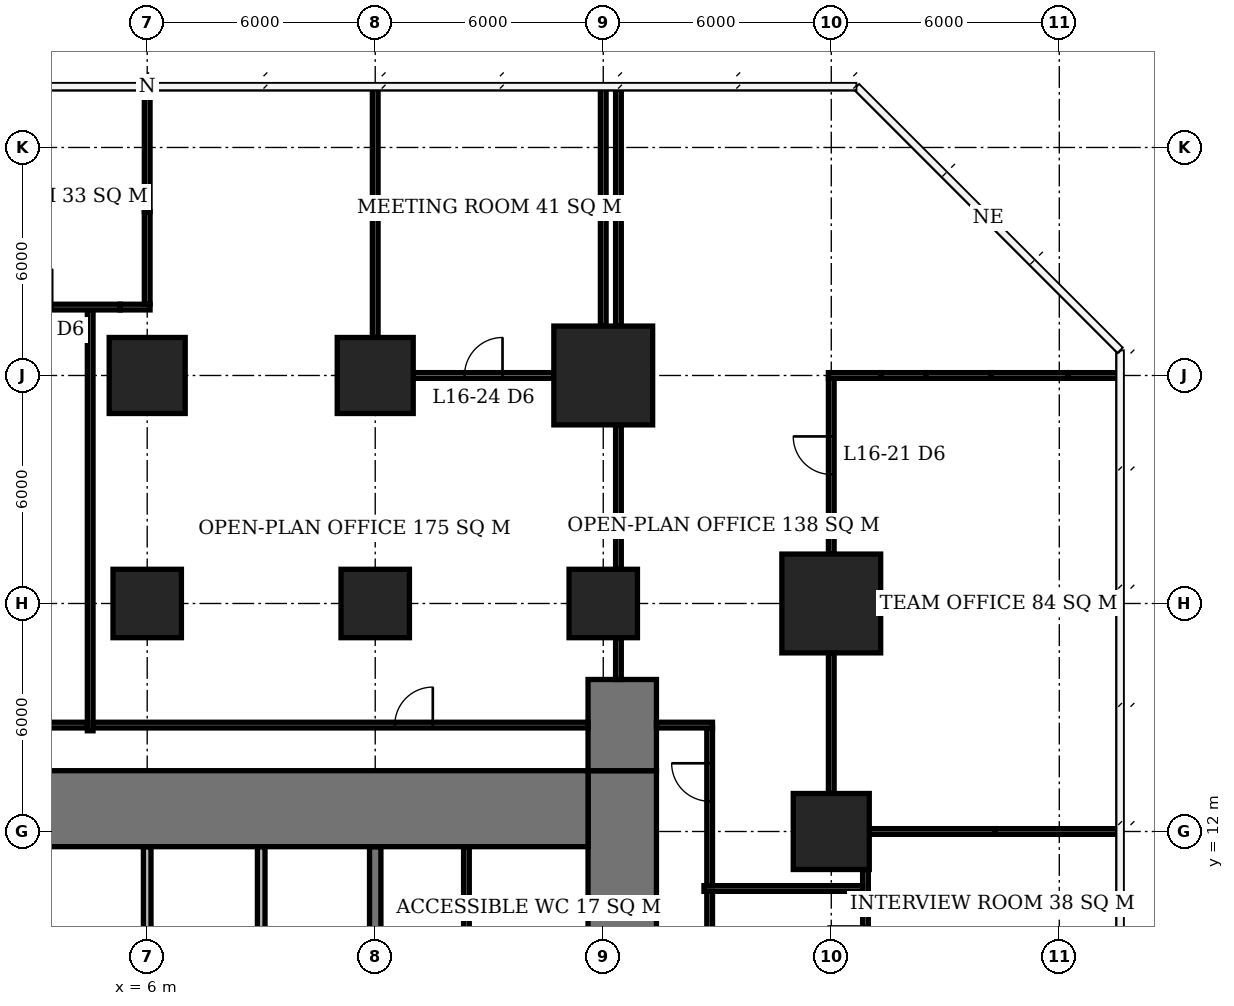
"""IFC4 building model, lengths in metres.
Left out: names, types, materials, properties, quantities, classifications, styles, units other than length and angle.
Written with IfcOpenShell. Run it as: python <this file> out.ifc"""

import sys

from ifc_helpers import new_model, si_unit, direction, frame, frame_2d, origin, origin_2d, place, context, subcontext, project, spatial, rectangle, extrude, element, fill, save


model = new_model("IFC4")
c1 = context("Model", 3, precision=1e-05, world=origin(), true_north=direction((0.0, 1.0)))
c2 = subcontext(c1, "Body", "Model", "MODEL_VIEW")
j1 = project(units=[si_unit("LENGTHUNIT", "METRE"), si_unit("PLANEANGLEUNIT", "RADIAN")], contexts=[c1])
p1 = place(None, origin())
s1 = spatial("IfcSite", under=j1, at=p1, CompositionType="ELEMENT")
p2 = place(p1, origin())
s2 = spatial("IfcBuilding", under=s1, at=p2, CompositionType="ELEMENT")
p3 = place(p2, frame((0.0, 0.0, 68.9)))
s3 = spatial("IfcBuildingStorey", under=s2, at=p3, CompositionType="ELEMENT", Elevation=68.9)
p4 = place(p3, frame((6.0, 18.0, 0.0), z_axis=(0.0, 0.0, 1.0), x_axis=(1.0, 0.0, 0.0)))
e1 = element("IfcColumn", 1, at=p4, inside=s3, PredefinedType="COLUMN", context=c2, shape_type="SweptSolid", body=[
    extrude(rectangle(XDim=1.8, YDim=1.8, at=origin_2d()), origin(), (0.0, 0.0, 1.0), 3.9),
])
p5 = place(p3, frame((6.0, 24.0, 0.0), z_axis=(0.0, 0.0, 1.0), x_axis=(1.0, 0.0, 0.0)))
e2 = element("IfcColumn", 2, at=p5, inside=s3, PredefinedType="COLUMN", context=c2, shape_type="SweptSolid", body=[
    extrude(rectangle(XDim=2.0, YDim=2.0, at=origin_2d()), origin(), (0.0, 0.0, 1.0), 3.9),
])
p6 = place(p3, frame((12.0, 18.0, 0.0), z_axis=(0.0, 0.0, 1.0), x_axis=(1.0, 0.0, 0.0)))
e3 = element("IfcColumn", 3, at=p6, inside=s3, PredefinedType="COLUMN", context=c2, shape_type="SweptSolid", body=[
    extrude(rectangle(XDim=1.8, YDim=1.8, at=origin_2d()), origin(), (0.0, 0.0, 1.0), 3.9),
])
p7 = place(p3, frame((12.0, 24.0, 0.0), z_axis=(0.0, 0.0, 1.0), x_axis=(1.0, 0.0, 0.0)))
e4 = element("IfcColumn", 4, at=p7, inside=s3, PredefinedType="COLUMN", context=c2, shape_type="SweptSolid", body=[
    extrude(rectangle(XDim=2.0, YDim=2.0, at=origin_2d()), origin(), (0.0, 0.0, 1.0), 3.9),
])
p8 = place(p3, frame((18.0, 18.0, 0.0), z_axis=(0.0, 0.0, 1.0), x_axis=(1.0, 0.0, 0.0)))
e5 = element("IfcColumn", 5, at=p8, inside=s3, PredefinedType="COLUMN", context=c2, shape_type="SweptSolid", body=[
    extrude(rectangle(XDim=1.8, YDim=1.8, at=origin_2d()), origin(), (0.0, 0.0, 1.0), 3.9),
])
p9 = place(p3, frame((18.0, 24.0, 0.0), z_axis=(0.0, 0.0, 1.0), x_axis=(1.0, 0.0, 0.0)))
e6 = element("IfcColumn", 6, at=p9, inside=s3, PredefinedType="COLUMN", context=c2, shape_type="SweptSolid", body=[
    extrude(rectangle(XDim=2.6, YDim=2.6, at=origin_2d()), origin(), (0.0, 0.0, 1.0), 3.9),
])
p10 = place(p3, frame((24.0, 12.0, 0.0), z_axis=(0.0, 0.0, 1.0), x_axis=(1.0, 0.0, 0.0)))
e7 = element("IfcColumn", 7, at=p10, inside=s3, PredefinedType="COLUMN", context=c2, shape_type="SweptSolid", body=[
    extrude(rectangle(XDim=2.0, YDim=2.0, at=origin_2d()), origin(), (0.0, 0.0, 1.0), 3.9),
])
p11 = place(p3, frame((24.0, 18.0, 0.0), z_axis=(0.0, 0.0, 1.0), x_axis=(1.0, 0.0, 0.0)))
e8 = element("IfcColumn", 8, at=p11, inside=s3, PredefinedType="COLUMN", context=c2, shape_type="SweptSolid", body=[
    extrude(rectangle(XDim=2.6, YDim=2.6, at=origin_2d()), origin(), (0.0, 0.0, 1.0), 3.9),
])
p12 = place(p3, frame((-5.6, 12.6, 0.0), z_axis=(0.0, 0.0, 1.0), x_axis=(1.0, 0.0, 0.0)))
e9 = element("IfcWall", 9, at=p12, inside=s3, PredefinedType="SHEAR", context=c2, shape_type="SweptSolid", body=[
    extrude(rectangle(XDim=23.2, YDim=2.0, at=frame_2d((11.6, 0.0))), origin(), (0.0, 0.0, 1.0), 3.9),
])
p13 = place(p3, frame((18.5, -7.6, 0.0), z_axis=(0.0, 0.0, 1.0), x_axis=(0.0, 1.0, 0.0)))
e10 = element("IfcWall", 10, at=p13, inside=s3, PredefinedType="SHEAR", context=c2, shape_type="SweptSolid", body=[
    extrude(rectangle(XDim=21.2, YDim=1.8, at=frame_2d((10.6, 0.0))), origin(), (0.0, 0.0, 1.0), 3.9),
])
p14 = place(p13, frame((9.2, 0.0, 0.0)))
e11 = element("IfcOpeningElement", 11, at=p14, cuts=e10, PredefinedType="OPENING", context=c2, shape_type="SweptSolid", body=[
    extrude(rectangle(XDim=1.8, YDim=2.4, at=frame_2d((0.9, 1.2))), frame((0.0, 0.91, 0.0), z_axis=(0.0, -1.0, 0.0), x_axis=(1.0, 0.0, 0.0)), (0.0, 0.0, 1.0), 1.82),
])
p15 = place(p3, frame((18.5, 13.6, 0.0), z_axis=(0.0, 0.0, 1.0), x_axis=(0.0, 1.0, 0.0)))
e12 = element("IfcWall", 12, at=p15, inside=s3, PredefinedType="SHEAR", context=c2, shape_type="SweptSolid", body=[
    extrude(rectangle(XDim=2.4, YDim=1.8, at=frame_2d((1.2, 0.0))), origin(), (0.0, 0.0, 1.0), 3.9),
])
p16 = place(p3, frame((12.0, 6.15, 0.0), z_axis=(0.0, 0.0, 1.0), x_axis=(0.0, 1.0, 0.0)))
e13 = element("IfcWall", 13, at=p16, inside=s3, PredefinedType="SHEAR", context=c2, shape_type="SweptSolid", body=[
    extrude(rectangle(XDim=5.45, YDim=0.3, at=frame_2d((2.725, 0.0))), origin(), (0.0, 0.0, 1.0), 3.9),
])
for number, where, z_axis, x_axis in (
    (14, (6.0, 6.15, 0.0), (0.0, 0.0, 1.0), (0.0, 1.0, 0.0)),
    (15, (9.0, 6.15, 0.0), (0.0, 0.0, 1.0), (0.0, 1.0, 0.0)),
):
    element("IfcWall", number, at=place(p3, frame(where, z_axis=z_axis, x_axis=x_axis)), inside=s3, PredefinedType="SOLIDWALL", context=c2, shape_type="SweptSolid", body=[
        extrude(rectangle(XDim=5.45, YDim=0.2, at=frame_2d((2.725, 0.0))), origin(), (0.0, 0.0, 1.0), 3.9),
    ])
p17 = place(p3, frame((14.4, 6.15, 0.0), z_axis=(0.0, 0.0, 1.0), x_axis=(0.0, 1.0, 0.0)))
e16 = element("IfcWall", 16, at=p17, inside=s3, PredefinedType="PLUMBINGWALL", context=c2, shape_type="SweptSolid", body=[
    extrude(rectangle(XDim=5.45, YDim=0.15, at=frame_2d((2.725, 0.0))), origin(), (0.0, 0.0, 1.0), 3.65),
])
p18 = place(p3, frame((25.0, 12.0, 0.0), z_axis=(0.0, 0.0, 1.0), x_axis=(1.0, 0.0, 0.0)))
e17 = element("IfcWall", 17, at=p18, inside=s3, PredefinedType="PARTITIONING", context=c2, shape_type="SweptSolid", body=[
    extrude(rectangle(XDim=3.31, YDim=0.15, at=frame_2d((1.655, 0.0))), origin(), (0.0, 0.0, 1.0), 2.65),
])
p19 = place(p3, frame((28.31, 12.0, 0.0), z_axis=(0.0, 0.0, 1.0), x_axis=(1.0, 0.0, 0.0)))
e18 = element("IfcWall", 18, at=p19, inside=s3, PredefinedType="PARTITIONING", context=c2, shape_type="SweptSolid", body=[
    extrude(rectangle(XDim=3.29, YDim=0.15, at=frame_2d((1.645, 0.0))), origin(), (0.0, 0.0, 1.0), 3.65),
])
p20 = place(p3, frame((13.0, 24.0, 0.0), z_axis=(0.0, 0.0, 1.0), x_axis=(1.0, 0.0, 0.0)))
e19 = element("IfcWall", 19, at=p20, inside=s3, PredefinedType="PARTITIONING", context=c2, shape_type="SweptSolid", body=[
    extrude(rectangle(XDim=3.7, YDim=0.15, at=frame_2d((1.85, 0.0))), origin(), (0.0, 0.0, 1.0), 3.65),
])
p21 = place(p20, frame((1.35, 0.0, 0.0)))
e20 = element("IfcOpeningElement", 20, at=p21, cuts=e19, PredefinedType="OPENING", context=c2, shape_type="SweptSolid", body=[
    extrude(rectangle(XDim=1.0, YDim=2.1, at=frame_2d((0.5, 1.05))), frame((0.0, 0.085, 0.0), z_axis=(0.0, -1.0, 0.0), x_axis=(1.0, 0.0, 0.0)), (0.0, 0.0, 1.0), 0.17),
])
p22 = place(p3, frame((23.925, 24.0, 0.0), z_axis=(0.0, 0.0, 1.0), x_axis=(1.0, 0.0, 0.0)))
e21 = element("IfcWall", 21, at=p22, inside=s3, PredefinedType="PARTITIONING", context=c2, shape_type="SweptSolid", body=[
    extrude(rectangle(XDim=1.385, YDim=0.15, at=frame_2d((0.692, 0.0))), origin(), (0.0, 0.0, 1.0), 3.65),
])
p23 = place(p3, frame((25.31, 24.0, 0.0), z_axis=(0.0, 0.0, 1.0), x_axis=(1.0, 0.0, 0.0)))
e22 = element("IfcWall", 22, at=p23, inside=s3, PredefinedType="PARTITIONING", context=c2, shape_type="SweptSolid", body=[
    extrude(rectangle(XDim=1.18, YDim=0.15, at=frame_2d((0.59, 0.0))), origin(), (0.0, 0.0, 1.0), 2.65),
])
p24 = place(p3, frame((26.49, 24.0, 0.0), z_axis=(0.0, 0.0, 1.0), x_axis=(1.0, 0.0, 0.0)))
e23 = element("IfcWall", 23, at=p24, inside=s3, PredefinedType="PARTITIONING", context=c2, shape_type="SweptSolid", body=[
    extrude(rectangle(XDim=1.718, YDim=0.15, at=frame_2d((0.859, 0.0))), origin(), (0.0, 0.0, 1.0), 3.65),
])
p25 = place(p3, frame((28.208, 24.0, 0.0), z_axis=(0.0, 0.0, 1.0), x_axis=(1.0, 0.0, 0.0)))
e24 = element("IfcWall", 24, at=p25, inside=s3, PredefinedType="PARTITIONING", context=c2, shape_type="SweptSolid", body=[
    extrude(rectangle(XDim=2.029, YDim=0.15, at=frame_2d((1.015, 0.0))), origin(), (0.0, 0.0, 1.0), 2.65),
])
p26 = place(p3, frame((30.237, 24.0, 0.0), z_axis=(0.0, 0.0, 1.0), x_axis=(1.0, 0.0, 0.0)))
e25 = element("IfcWall", 25, at=p26, inside=s3, PredefinedType="PARTITIONING", context=c2, shape_type="SweptSolid", body=[
    extrude(rectangle(XDim=1.363, YDim=0.15, at=frame_2d((0.682, 0.0))), origin(), (0.0, 0.0, 1.0), 3.65),
])
p27 = place(p3, frame((0.71, 25.8, 0.0), z_axis=(0.0, 0.0, 1.0), x_axis=(1.0, 0.0, 0.0)))
e26 = element("IfcWall", 26, at=p27, inside=s3, PredefinedType="PARTITIONING", context=c2, shape_type="SweptSolid", body=[
    extrude(rectangle(XDim=4.58, YDim=0.15, at=frame_2d((2.29, 0.0))), origin(), (0.0, 0.0, 1.0), 3.65),
])
p28 = place(p27, frame((1.79, 0.0, 0.0)))
e27 = element("IfcOpeningElement", 27, at=p28, cuts=e26, PredefinedType="OPENING", context=c2, shape_type="SweptSolid", body=[
    extrude(rectangle(XDim=1.0, YDim=2.1, at=frame_2d((0.5, 1.05))), frame((0.0, 0.085, 0.0), z_axis=(0.0, -1.0, 0.0), x_axis=(1.0, 0.0, 0.0)), (0.0, 0.0, 1.0), 0.17),
])
p29 = place(p3, frame((5.29, 25.8, 0.0), z_axis=(0.0, 0.0, 1.0), x_axis=(1.0, 0.0, 0.0)))
e28 = element("IfcWall", 28, at=p29, inside=s3, PredefinedType="PARTITIONING", context=c2, shape_type="SweptSolid", body=[
    extrude(rectangle(XDim=0.785, YDim=0.15, at=frame_2d((0.393, 0.0))), origin(), (0.0, 0.0, 1.0), 2.65),
])
p30 = place(p3, frame((6.0, 25.875, 0.0), z_axis=(0.0, 0.0, 1.0), x_axis=(0.0, 1.0, 0.0)))
e29 = element("IfcWall", 29, at=p30, inside=s3, PredefinedType="PARTITIONING", context=c2, shape_type="SweptSolid", body=[
    extrude(rectangle(XDim=2.435, YDim=0.15, at=frame_2d((1.218, 0.0))), origin(), (0.0, 0.0, 1.0), 2.65),
])
p31 = place(p3, frame((6.0, 28.31, 0.0), z_axis=(0.0, 0.0, 1.0), x_axis=(0.0, 1.0, 0.0)))
e30 = element("IfcWall", 30, at=p31, inside=s3, PredefinedType="PARTITIONING", context=c2, shape_type="SweptSolid", body=[
    extrude(rectangle(XDim=3.24, YDim=0.15, at=frame_2d((1.62, 0.0))), origin(), (0.0, 0.0, 1.0), 3.65),
])
p32 = place(p3, frame((12.0, 25.0, 0.0), z_axis=(0.0, 0.0, 1.0), x_axis=(0.0, 1.0, 0.0)))
e31 = element("IfcWall", 31, at=p32, inside=s3, PredefinedType="PARTITIONING", context=c2, shape_type="SweptSolid", body=[
    extrude(rectangle(XDim=3.31, YDim=0.15, at=frame_2d((1.655, 0.0))), origin(), (0.0, 0.0, 1.0), 2.65),
])
p33 = place(p3, frame((12.0, 28.31, 0.0), z_axis=(0.0, 0.0, 1.0), x_axis=(0.0, 1.0, 0.0)))
e32 = element("IfcWall", 32, at=p33, inside=s3, PredefinedType="PARTITIONING", context=c2, shape_type="SweptSolid", body=[
    extrude(rectangle(XDim=3.29, YDim=0.15, at=frame_2d((1.645, 0.0))), origin(), (0.0, 0.0, 1.0), 3.65),
])
p34 = place(p3, frame((18.0, 25.3, 0.0), z_axis=(0.0, 0.0, 1.0), x_axis=(0.0, 1.0, 0.0)))
e33 = element("IfcWall", 33, at=p34, inside=s3, PredefinedType="PARTITIONING", context=c2, shape_type="SweptSolid", body=[
    extrude(rectangle(XDim=3.01, YDim=0.15, at=frame_2d((1.505, 0.0))), origin(), (0.0, 0.0, 1.0), 2.65),
])
p35 = place(p3, frame((18.0, 28.31, 0.0), z_axis=(0.0, 0.0, 1.0), x_axis=(0.0, 1.0, 0.0)))
e34 = element("IfcWall", 34, at=p35, inside=s3, PredefinedType="PARTITIONING", context=c2, shape_type="SweptSolid", body=[
    extrude(rectangle(XDim=3.29, YDim=0.15, at=frame_2d((1.645, 0.0))), origin(), (0.0, 0.0, 1.0), 3.65),
])
p36 = place(p3, frame((24.0, 13.0, 0.0), z_axis=(0.0, 0.0, 1.0), x_axis=(0.0, 1.0, 0.0)))
e35 = element("IfcWall", 35, at=p36, inside=s3, PredefinedType="PARTITIONING", context=c2, shape_type="SweptSolid", body=[
    extrude(rectangle(XDim=3.7, YDim=0.15, at=frame_2d((1.85, 0.0))), origin(), (0.0, 0.0, 1.0), 3.65),
])
p37 = place(p3, frame((24.0, 19.3, 0.0), z_axis=(0.0, 0.0, 1.0), x_axis=(0.0, 1.0, 0.0)))
e36 = element("IfcWall", 36, at=p37, inside=s3, PredefinedType="PARTITIONING", context=c2, shape_type="SweptSolid", body=[
    extrude(rectangle(XDim=0.492, YDim=0.15, at=frame_2d((0.246, 0.0))), origin(), (0.0, 0.0, 1.0), 2.65),
])
p38 = place(p3, frame((24.0, 19.792, 0.0), z_axis=(0.0, 0.0, 1.0), x_axis=(0.0, 1.0, 0.0)))
e37 = element("IfcWall", 37, at=p38, inside=s3, PredefinedType="PARTITIONING", context=c2, shape_type="SweptSolid", body=[
    extrude(rectangle(XDim=4.133, YDim=0.15, at=frame_2d((2.066, 0.0))), origin(), (0.0, 0.0, 1.0), 3.65),
])
p39 = place(p38, frame((1.604, 0.0, 0.0)))
e38 = element("IfcOpeningElement", 38, at=p39, cuts=e37, PredefinedType="OPENING", context=c2, shape_type="SweptSolid", body=[
    extrude(rectangle(XDim=1.0, YDim=2.1, at=frame_2d((0.5, 1.05))), frame((0.0, 0.085, 0.0), z_axis=(0.0, -1.0, 0.0), x_axis=(1.0, 0.0, 0.0)), (0.0, 0.0, 1.0), 0.17),
])
p40 = place(p3, frame((24.9, 7.0, 0.0), z_axis=(0.0, 0.0, 1.0), x_axis=(0.0, 1.0, 0.0)))
e39 = element("IfcWall", 39, at=p40, inside=s3, PredefinedType="PARTITIONING", context=c2, shape_type="SweptSolid", body=[
    extrude(rectangle(XDim=4.0, YDim=0.15, at=frame_2d((2.0, 0.0))), origin(), (0.0, 0.0, 1.0), 3.65),
])
p41 = place(p40, frame((1.5, 0.0, 0.0)))
e40 = element("IfcOpeningElement", 40, at=p41, cuts=e39, PredefinedType="OPENING", context=c2, shape_type="SweptSolid", body=[
    extrude(rectangle(XDim=1.0, YDim=2.1, at=frame_2d((0.5, 1.05))), frame((0.0, 0.085, 0.0), z_axis=(0.0, -1.0, 0.0), x_axis=(1.0, 0.0, 0.0)), (0.0, 0.0, 1.0), 0.17),
])
p42 = place(p3, frame((-5.6, 14.8, 0.0), z_axis=(0.0, 0.0, 1.0), x_axis=(1.0, 0.0, 0.0)))
e41 = element("IfcWall", 41, at=p42, inside=s3, PredefinedType="PARTITIONING", context=c2, shape_type="SweptSolid", body=[
    extrude(rectangle(XDim=10.025, YDim=0.15, at=frame_2d((5.013, 0.0))), origin(), (0.0, 0.0, 1.0), 3.65),
])
p43 = place(p42, frame((6.065, 0.0, 0.0)))
e42 = element("IfcOpeningElement", 42, at=p43, cuts=e41, PredefinedType="OPENING", context=c2, shape_type="SweptSolid", body=[
    extrude(rectangle(XDim=1.0, YDim=2.1, at=frame_2d((0.5, 1.05))), frame((0.0, 0.085, 0.0), z_axis=(0.0, -1.0, 0.0), x_axis=(1.0, 0.0, 0.0)), (0.0, 0.0, 1.0), 0.17),
])
p44 = place(p3, frame((4.5, 14.65, 0.0), z_axis=(0.0, 0.0, 1.0), x_axis=(0.0, 1.0, 0.0)))
e43 = element("IfcWall", 43, at=p44, inside=s3, PredefinedType="PARTITIONING", context=c2, shape_type="SweptSolid", body=[
    extrude(rectangle(XDim=11.075, YDim=0.15, at=frame_2d((5.538, 0.0))), origin(), (0.0, 0.0, 1.0), 3.65),
])
p45 = place(p3, frame((4.575, 14.8, 0.0), z_axis=(0.0, 0.0, 1.0), x_axis=(1.0, 0.0, 0.0)))
e44 = element("IfcWall", 44, at=p45, inside=s3, PredefinedType="PARTITIONING", context=c2, shape_type="SweptSolid", body=[
    extrude(rectangle(XDim=13.025, YDim=0.15, at=frame_2d((6.513, 0.0))), origin(), (0.0, 0.0, 1.0), 3.65),
])
p46 = place(p45, frame((7.94, 0.0, 0.0)))
e45 = element("IfcOpeningElement", 45, at=p46, cuts=e44, PredefinedType="OPENING", context=c2, shape_type="SweptSolid", body=[
    extrude(rectangle(XDim=1.0, YDim=2.1, at=frame_2d((0.5, 1.05))), frame((0.0, 0.085, 0.0), z_axis=(0.0, -1.0, 0.0), x_axis=(1.0, 0.0, 0.0)), (0.0, 0.0, 1.0), 0.17),
])
p47 = place(p3, frame((18.4, 16.0, 0.0), z_axis=(0.0, 0.0, 1.0), x_axis=(0.0, 1.0, 0.0)))
e46 = element("IfcWall", 46, at=p47, inside=s3, PredefinedType="PARTITIONING", context=c2, shape_type="SweptSolid", body=[
    extrude(rectangle(XDim=1.1, YDim=0.15, at=frame_2d((0.55, 0.0))), origin(), (0.0, 0.0, 1.0), 3.65),
])
p48 = place(p3, frame((18.4, 18.9, 0.0), z_axis=(0.0, 0.0, 1.0), x_axis=(0.0, 1.0, 0.0)))
e47 = element("IfcWall", 47, at=p48, inside=s3, PredefinedType="PARTITIONING", context=c2, shape_type="SweptSolid", body=[
    extrude(rectangle(XDim=3.8, YDim=0.15, at=frame_2d((1.9, 0.0))), origin(), (0.0, 0.0, 1.0), 3.65),
])
p49 = place(p3, frame((18.4, 25.3, 0.0), z_axis=(0.0, 0.0, 1.0), x_axis=(0.0, 1.0, 0.0)))
e48 = element("IfcWall", 48, at=p49, inside=s3, PredefinedType="PARTITIONING", context=c2, shape_type="SweptSolid", body=[
    extrude(rectangle(XDim=3.01, YDim=0.15, at=frame_2d((1.505, 0.0))), origin(), (0.0, 0.0, 1.0), 2.65),
])
p50 = place(p3, frame((18.4, 28.31, 0.0), z_axis=(0.0, 0.0, 1.0), x_axis=(0.0, 1.0, 0.0)))
e49 = element("IfcWall", 49, at=p50, inside=s3, PredefinedType="PARTITIONING", context=c2, shape_type="SweptSolid", body=[
    extrude(rectangle(XDim=3.24, YDim=0.15, at=frame_2d((1.62, 0.0))), origin(), (0.0, 0.0, 1.0), 3.65),
])
p51 = place(p3, frame((19.4, 14.8, 0.0), z_axis=(0.0, 0.0, 1.0), x_axis=(1.0, 0.0, 0.0)))
e50 = element("IfcWall", 50, at=p51, inside=s3, PredefinedType="PARTITIONING", context=c2, shape_type="SweptSolid", body=[
    extrude(rectangle(XDim=1.475, YDim=0.15, at=frame_2d((0.738, 0.0))), origin(), (0.0, 0.0, 1.0), 3.65),
])
p52 = place(p3, frame((20.8, -7.5, 0.0), z_axis=(0.0, 0.0, 1.0), x_axis=(0.0, 1.0, 0.0)))
e51 = element("IfcWall", 51, at=p52, inside=s3, PredefinedType="PARTITIONING", context=c2, shape_type="SweptSolid", body=[
    extrude(rectangle(XDim=17.925, YDim=0.15, at=frame_2d((8.962, 0.0))), origin(), (0.0, 0.0, 1.0), 3.65),
])
p53 = place(p52, frame((11.2, 0.0, 0.0)))
e52 = element("IfcOpeningElement", 52, at=p53, cuts=e51, PredefinedType="OPENING", context=c2, shape_type="SweptSolid", body=[
    extrude(rectangle(XDim=1.0, YDim=2.1, at=frame_2d((0.5, 1.05))), frame((0.0, 0.085, 0.0), z_axis=(0.0, -1.0, 0.0), x_axis=(1.0, 0.0, 0.0)), (0.0, 0.0, 1.0), 0.17),
])
p54 = place(p3, frame((20.8, 10.575, 0.0), z_axis=(0.0, 0.0, 1.0), x_axis=(0.0, 1.0, 0.0)))
e53 = element("IfcWall", 53, at=p54, inside=s3, PredefinedType="PARTITIONING", context=c2, shape_type="SweptSolid", body=[
    extrude(rectangle(XDim=4.15, YDim=0.15, at=frame_2d((2.075, 0.0))), origin(), (0.0, 0.0, 1.0), 3.65),
])
p55 = place(p54, frame((2.22, 0.0, 0.0)))
e54 = element("IfcOpeningElement", 54, at=p55, cuts=e53, PredefinedType="OPENING", context=c2, shape_type="SweptSolid", body=[
    extrude(rectangle(XDim=1.0, YDim=2.1, at=frame_2d((0.5, 1.05))), frame((0.0, 0.085, 0.0), z_axis=(0.0, -1.0, 0.0), x_axis=(1.0, 0.0, 0.0)), (0.0, 0.0, 1.0), 0.17),
])
p56 = place(p3, frame((20.65, 10.5, 0.0), z_axis=(0.0, 0.0, 1.0), x_axis=(1.0, 0.0, 0.0)))
e55 = element("IfcWall", 55, at=p56, inside=s3, PredefinedType="PARTITIONING", context=c2, shape_type="SweptSolid", body=[
    extrude(rectangle(XDim=4.175, YDim=0.15, at=frame_2d((2.087, 0.0))), origin(), (0.0, 0.0, 1.0), 3.65),
])
p57 = place(p39, origin())
e56 = element("IfcDoor", 56, at=p57, inside=s3, OperationType="SINGLE_SWING_RIGHT", PredefinedType="DOOR", context=c2, shape_type="SweptSolid", body=[
    extrude(rectangle(XDim=1.0, YDim=2.1, at=frame_2d((0.5, 1.05))), frame((0.0, 0.025, 0.0), z_axis=(0.0, -1.0, 0.0), x_axis=(1.0, 0.0, 0.0)), (0.0, 0.0, 1.0), 0.05),
])
fill(e38, e56)
p58 = place(p21, origin())
e57 = element("IfcDoor", 57, at=p58, inside=s3, OperationType="SINGLE_SWING_RIGHT", PredefinedType="DOOR", context=c2, shape_type="SweptSolid", body=[
    extrude(rectangle(XDim=1.0, YDim=2.1, at=frame_2d((0.5, 1.05))), frame((0.0, 0.025, 0.0), z_axis=(0.0, -1.0, 0.0), x_axis=(1.0, 0.0, 0.0)), (0.0, 0.0, 1.0), 0.05),
])
fill(e20, e57)
p59 = place(p46, origin())
e58 = element("IfcDoor", 58, at=p59, inside=s3, OperationType="SINGLE_SWING_RIGHT", PredefinedType="DOOR", context=c2, shape_type="SweptSolid", body=[
    extrude(rectangle(XDim=1.0, YDim=2.1, at=frame_2d((0.5, 1.05))), frame((0.0, 0.025, 0.0), z_axis=(0.0, -1.0, 0.0), x_axis=(1.0, 0.0, 0.0)), (0.0, 0.0, 1.0), 0.05),
])
fill(e45, e58)
p60 = place(p55, origin())
e59 = element("IfcDoor", 59, at=p60, inside=s3, OperationType="SINGLE_SWING_RIGHT", PredefinedType="DOOR", context=c2, shape_type="SweptSolid", body=[
    extrude(rectangle(XDim=1.0, YDim=2.1, at=frame_2d((0.5, 1.05))), frame((0.0, 0.025, 0.0), z_axis=(0.0, -1.0, 0.0), x_axis=(1.0, 0.0, 0.0)), (0.0, 0.0, 1.0), 0.05),
])
fill(e54, e59)
save(model, sys.argv[1])
